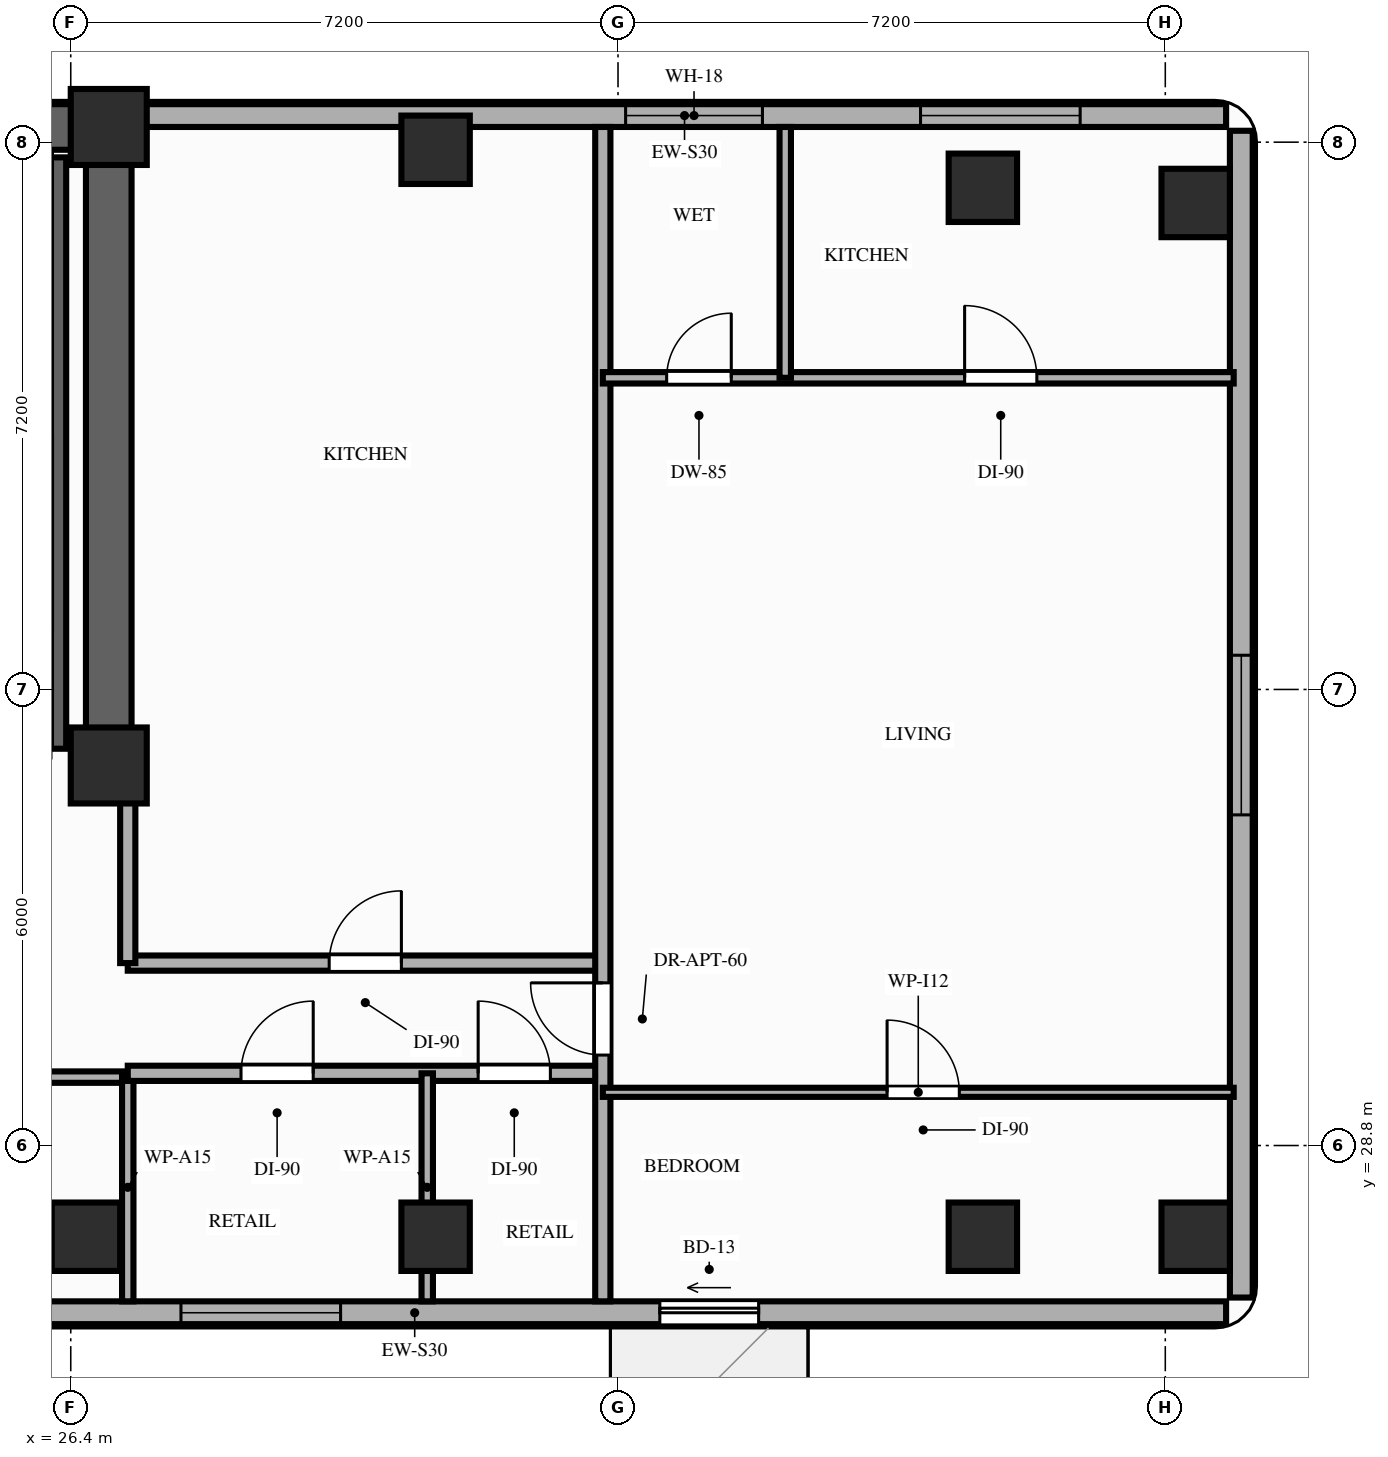
"""IFC4 building model, lengths in metres.
Left out: names, types, materials, properties, quantities, classifications, styles, units other than length and angle.
Written with IfcOpenShell. Run it as: python <this file> out.ifc"""

import sys

from ifc_helpers import new_model, si_unit, direction, frame, frame_2d, origin, origin_2d, place, context, subcontext, project, spatial, rectangle, extrude, element, fill, save


model = new_model("IFC4")
c1 = context("Model", 3, precision=1e-05, world=origin(), true_north=direction((0.0, 1.0)))
c2 = subcontext(c1, "Body", "Model", "MODEL_VIEW")
j1 = project(units=[si_unit("LENGTHUNIT", "METRE"), si_unit("PLANEANGLEUNIT", "RADIAN")], contexts=[c1])
p1 = place(None, origin())
s1 = spatial("IfcSite", under=j1, at=p1, CompositionType="ELEMENT")
p2 = place(p1, origin())
s2 = spatial("IfcBuilding", under=s1, at=p2, CompositionType="ELEMENT")
p3 = place(p2, frame((0.0, 0.0, 176.0)))
s3 = spatial("IfcBuildingStorey", under=s2, at=p3, CompositionType="ELEMENT", Elevation=176.0)
for number, where, z_axis, x_axis in (
    (1, (26.9, 33.8, 0.0), (0.0, 0.0, 1.0), (1.0, 0.0, 0.0)),
    (2, (26.9, 42.2, 0.0), (0.0, 0.0, 1.0), (1.0, 0.0, 0.0)),
):
    element("IfcColumn", number, at=place(p3, frame(where, z_axis=z_axis, x_axis=x_axis)), inside=s3, PredefinedType="COLUMN", context=c2, shape_type="SweptSolid", body=[
        extrude(rectangle(XDim=1.0, YDim=1.0, at=origin_2d()), origin(), (0.0, 0.0, 1.0), 3.2),
    ])
for number, where, z_axis, x_axis in (
    (3, (26.6, 27.6, 0.0), (0.0, 0.0, 1.0), (1.0, 0.0, 0.0)),
    (4, (31.2, 27.6, 0.0), (0.0, 0.0, 1.0), (1.0, 0.0, 0.0)),
    (5, (31.2, 41.9, 0.0), (0.0, 0.0, 1.0), (1.0, 0.0, 0.0)),
    (6, (38.4, 27.6, 0.0), (0.0, 0.0, 1.0), (1.0, 0.0, 0.0)),
    (7, (38.4, 41.4, 0.0), (0.0, 0.0, 1.0), (1.0, 0.0, 0.0)),
    (8, (41.2, 27.6, 0.0), (0.0, 0.0, 1.0), (1.0, 0.0, 0.0)),
    (9, (41.2, 41.2, 0.0), (0.0, 0.0, 1.0), (1.0, 0.0, 0.0)),
):
    element("IfcColumn", number, at=place(p3, frame(where, z_axis=z_axis, x_axis=x_axis)), inside=s3, PredefinedType="COLUMN", context=c2, shape_type="SweptSolid", body=[
        extrude(rectangle(XDim=0.9, YDim=0.9, at=origin_2d()), origin(), (0.0, 0.0, 1.0), 3.2),
    ])
p4 = place(p3, frame((41.6, 42.35, 0.0), z_axis=(0.0, 0.0, 1.0), x_axis=(-1.0, 0.0, 0.0)))
e10 = element("IfcWall", 10, at=p4, inside=s3, PredefinedType="STANDARD", context=c2, shape_type="SweptSolid", body=[
    extrude(rectangle(XDim=14.25, YDim=0.3, at=frame_2d((7.125, 0.0))), origin(), (0.0, 0.0, 1.0), 2.46),
])
p5 = place(p4, frame((6.1, 0.0, 0.85)))
e11 = element("IfcOpeningElement", 11, at=p5, cuts=e10, PredefinedType="OPENING", context=c2, shape_type="SweptSolid", body=[
    extrude(rectangle(XDim=1.8, YDim=1.36, at=frame_2d((0.9, 0.68))), frame((0.0, 0.16, 0.0), z_axis=(0.0, -1.0, 0.0), x_axis=(1.0, 0.0, 0.0)), (0.0, 0.0, 1.0), 0.32),
])
p6 = place(p4, frame((1.92, 0.0, 0.85)))
e12 = element("IfcOpeningElement", 12, at=p6, cuts=e10, PredefinedType="OPENING", context=c2, shape_type="SweptSolid", body=[
    extrude(rectangle(XDim=2.1, YDim=1.36, at=frame_2d((1.05, 0.68))), frame((0.0, 0.16, 0.0), z_axis=(0.0, -1.0, 0.0), x_axis=(1.0, 0.0, 0.0)), (0.0, 0.0, 1.0), 0.32),
])
p7 = place(p3, frame((20.25, 26.6, 0.0), z_axis=(0.0, 0.0, 1.0), x_axis=(1.0, 0.0, 0.0)))
e13 = element("IfcWall", 13, at=p7, inside=s3, PredefinedType="STANDARD", context=c2, shape_type="SweptSolid", body=[
    extrude(rectangle(XDim=21.35, YDim=0.3, at=frame_2d((10.675, 0.0))), origin(), (0.0, 0.0, 1.0), 2.71),
])
p8 = place(p7, frame((13.9, 0.0, 0.0)))
e14 = element("IfcOpeningElement", 14, at=p8, cuts=e13, PredefinedType="OPENING", context=c2, shape_type="SweptSolid", body=[
    extrude(rectangle(XDim=1.3, YDim=2.08, at=frame_2d((0.65, 1.04))), frame((0.0, 0.16, 0.0), z_axis=(0.0, -1.0, 0.0), x_axis=(1.0, 0.0, 0.0)), (0.0, 0.0, 1.0), 0.32),
])
p9 = place(p7, frame((2.1, 0.0, 0.85)))
e15 = element("IfcOpeningElement", 15, at=p9, cuts=e13, PredefinedType="OPENING", context=c2, shape_type="SweptSolid", body=[
    extrude(rectangle(XDim=2.1, YDim=1.61, at=frame_2d((1.05, 0.805))), frame((0.0, 0.16, 0.0), z_axis=(0.0, -1.0, 0.0), x_axis=(1.0, 0.0, 0.0)), (0.0, 0.0, 1.0), 0.32),
])
p10 = place(p7, frame((7.6, 0.0, 0.85)))
e16 = element("IfcOpeningElement", 16, at=p10, cuts=e13, PredefinedType="OPENING", context=c2, shape_type="SweptSolid", body=[
    extrude(rectangle(XDim=2.1, YDim=1.61, at=frame_2d((1.05, 0.805))), frame((0.0, 0.16, 0.0), z_axis=(0.0, -1.0, 0.0), x_axis=(1.0, 0.0, 0.0)), (0.0, 0.0, 1.0), 0.32),
])
p11 = place(p3, frame((41.8, 26.8, 0.0), z_axis=(0.0, 0.0, 1.0), x_axis=(0.0, 1.0, 0.0)))
e17 = element("IfcWall", 17, at=p11, inside=s3, PredefinedType="STANDARD", context=c2, shape_type="SweptSolid", body=[
    extrude(rectangle(XDim=15.35, YDim=0.3, at=frame_2d((7.675, 0.0))), origin(), (0.0, 0.0, 1.0), 3.02),
])
p12 = place(p11, frame((6.35, 0.0, 0.85)))
e18 = element("IfcOpeningElement", 18, at=p12, cuts=e17, PredefinedType="OPENING", context=c2, shape_type="SweptSolid", body=[
    extrude(rectangle(XDim=2.1, YDim=1.8, at=frame_2d((1.05, 0.9))), frame((0.0, 0.16, 0.0), z_axis=(0.0, -1.0, 0.0), x_axis=(1.0, 0.0, 0.0)), (0.0, 0.0, 1.0), 0.32),
])
p13 = place(p3, frame((6.45, 42.2, 0.0), z_axis=(0.0, 0.0, 1.0), x_axis=(1.0, 0.0, 0.0)))
e19 = element("IfcWall", 19, at=p13, inside=s3, PredefinedType="SHEAR", context=c2, shape_type="SweptSolid", body=[
    extrude(rectangle(XDim=20.45, YDim=0.6, at=frame_2d((10.225, 0.0))), origin(), (0.0, 0.0, 1.0), 3.02),
])
p14 = place(p3, frame((26.9, 33.8, 0.0), z_axis=(0.0, 0.0, 1.0), x_axis=(0.0, 1.0, 0.0)))
e20 = element("IfcWall", 20, at=p14, inside=s3, PredefinedType="SHEAR", context=c2, shape_type="SweptSolid", body=[
    extrude(rectangle(XDim=7.95, YDim=0.6, at=frame_2d((3.975, 0.0))), origin(), (0.0, 0.0, 1.0), 3.02),
])
p15 = place(p3, frame((26.24, 34.02, 0.0), z_axis=(0.0, 0.0, 1.0), x_axis=(0.0, 1.0, 0.0)))
e21 = element("IfcWall", 21, at=p15, inside=s3, PredefinedType="SHEAR", context=c2, shape_type="SweptSolid", body=[
    extrude(rectangle(XDim=7.78, YDim=0.2, at=frame_2d((3.89, 0.0))), origin(), (0.0, 0.0, 1.0), 3.02),
])
p16 = place(p3, frame((20.45, 29.7, 0.0), z_axis=(0.0, 0.0, 1.0), x_axis=(1.0, 0.0, 0.0)))
e22 = element("IfcWall", 22, at=p16, inside=s3, PredefinedType="PARTITIONING", context=c2, shape_type="SweptSolid", body=[
    extrude(rectangle(XDim=6.7, YDim=0.15, at=frame_2d((3.35, 0.0))), origin(), (0.0, 0.0, 1.0), 3.02),
])
p17 = place(p16, frame((2.8, 0.0, 0.0)))
e23 = element("IfcOpeningElement", 23, at=p17, cuts=e22, PredefinedType="OPENING", context=c2, shape_type="SweptSolid", body=[
    extrude(rectangle(XDim=0.95, YDim=2.15, at=frame_2d((0.475, 1.075))), frame((0.0, 0.085, 0.0), z_axis=(0.0, -1.0, 0.0), x_axis=(1.0, 0.0, 0.0)), (0.0, 0.0, 1.0), 0.17),
])
p18 = place(p3, frame((27.15, 26.75, 0.0), z_axis=(0.0, 0.0, 1.0), x_axis=(0.0, 1.0, 0.0)))
e24 = element("IfcWall", 24, at=p18, inside=s3, PredefinedType="PARTITIONING", context=c2, shape_type="SweptSolid", body=[
    extrude(rectangle(XDim=3.0, YDim=0.15, at=frame_2d((1.5, 0.0))), origin(), (0.0, 0.0, 1.0), 2.46),
])
p19 = place(p3, frame((27.15, 29.75, 0.0), z_axis=(0.0, 0.0, 1.0), x_axis=(1.0, 0.0, 0.0)))
e25 = element("IfcWall", 25, at=p19, inside=s3, PredefinedType="PARTITIONING", context=c2, shape_type="SweptSolid", body=[
    extrude(rectangle(XDim=6.25, YDim=0.2, at=frame_2d((3.125, 0.0))), origin(), (0.0, 0.0, 1.0), 2.46),
])
p20 = place(p19, frame((1.49, 0.0, 0.0)))
e26 = element("IfcOpeningElement", 26, at=p20, cuts=e25, PredefinedType="OPENING", context=c2, shape_type="SweptSolid", body=[
    extrude(rectangle(XDim=0.95, YDim=2.15, at=frame_2d((0.475, 1.075))), frame((0.0, 0.11, 0.0), z_axis=(0.0, -1.0, 0.0), x_axis=(1.0, 0.0, 0.0)), (0.0, 0.0, 1.0), 0.22),
])
p21 = place(p19, frame((4.61, 0.0, 0.0)))
e27 = element("IfcOpeningElement", 27, at=p21, cuts=e25, PredefinedType="OPENING", context=c2, shape_type="SweptSolid", body=[
    extrude(rectangle(XDim=0.95, YDim=2.15, at=frame_2d((0.475, 1.075))), frame((0.0, 0.11, 0.0), z_axis=(0.0, -1.0, 0.0), x_axis=(1.0, 0.0, 0.0)), (0.0, 0.0, 1.0), 0.22),
])
p22 = place(p3, frame((27.15, 31.2, 0.0), z_axis=(0.0, 0.0, 1.0), x_axis=(1.0, 0.0, 0.0)))
e28 = element("IfcWall", 28, at=p22, inside=s3, PredefinedType="PARTITIONING", context=c2, shape_type="SweptSolid", body=[
    extrude(rectangle(XDim=6.25, YDim=0.2, at=frame_2d((3.125, 0.0))), origin(), (0.0, 0.0, 1.0), 2.46),
])
p23 = place(p22, frame((2.65, 0.0, 0.0)))
e29 = element("IfcOpeningElement", 29, at=p23, cuts=e28, PredefinedType="OPENING", context=c2, shape_type="SweptSolid", body=[
    extrude(rectangle(XDim=0.95, YDim=2.15, at=frame_2d((0.475, 1.075))), frame((0.0, 0.11, 0.0), z_axis=(0.0, -1.0, 0.0), x_axis=(1.0, 0.0, 0.0)), (0.0, 0.0, 1.0), 0.22),
])
p24 = place(p3, frame((27.15, 31.2, 0.0), z_axis=(0.0, 0.0, 1.0), x_axis=(0.0, 1.0, 0.0)))
e30 = element("IfcWall", 30, at=p24, inside=s3, PredefinedType="PARTITIONING", context=c2, shape_type="SweptSolid", body=[
    extrude(rectangle(XDim=2.48, YDim=0.2, at=frame_2d((1.24, 0.0))), origin(), (0.0, 0.0, 1.0), 2.46),
])
p25 = place(p3, frame((33.4, 26.75, 0.0), z_axis=(0.0, 0.0, 1.0), x_axis=(0.0, 1.0, 0.0)))
e31 = element("IfcWall", 31, at=p25, inside=s3, PredefinedType="PARTITIONING", context=c2, shape_type="SweptSolid", body=[
    extrude(rectangle(XDim=15.45, YDim=0.2, at=frame_2d((7.725, 0.0))), origin(), (0.0, 0.0, 1.0), 2.46),
])
p26 = place(p25, frame((3.24, 0.0, 0.0)))
e32 = element("IfcOpeningElement", 32, at=p26, cuts=e31, PredefinedType="OPENING", context=c2, shape_type="SweptSolid", body=[
    extrude(rectangle(XDim=0.95, YDim=2.15, at=frame_2d((0.475, 1.075))), frame((0.0, 0.11, 0.0), z_axis=(0.0, -1.0, 0.0), x_axis=(1.0, 0.0, 0.0)), (0.0, 0.0, 1.0), 0.22),
])
p27 = place(p3, frame((33.4, 29.5, 0.0), z_axis=(0.0, 0.0, 1.0), x_axis=(1.0, 0.0, 0.0)))
e33 = element("IfcWall", 33, at=p27, inside=s3, PredefinedType="PARTITIONING", context=c2, shape_type="SweptSolid", body=[
    extrude(rectangle(XDim=8.3, YDim=0.12, at=frame_2d((4.15, 0.0))), origin(), (0.0, 0.0, 1.0), 2.46),
])
p28 = place(p27, frame((3.74, 0.0, 0.0)))
e34 = element("IfcOpeningElement", 34, at=p28, cuts=e33, PredefinedType="OPENING", context=c2, shape_type="SweptSolid", body=[
    extrude(rectangle(XDim=0.95, YDim=2.15, at=frame_2d((0.475, 1.075))), frame((0.0, 0.07, 0.0), z_axis=(0.0, -1.0, 0.0), x_axis=(1.0, 0.0, 0.0)), (0.0, 0.0, 1.0), 0.14),
])
p29 = place(p3, frame((33.4, 38.9, 0.0), z_axis=(0.0, 0.0, 1.0), x_axis=(1.0, 0.0, 0.0)))
e35 = element("IfcWall", 35, at=p29, inside=s3, PredefinedType="PARTITIONING", context=c2, shape_type="SweptSolid", body=[
    extrude(rectangle(XDim=8.3, YDim=0.15, at=frame_2d((4.15, 0.0))), origin(), (0.0, 0.0, 1.0), 2.46),
])
p30 = place(p29, frame((0.84, 0.0, 0.0)))
e36 = element("IfcOpeningElement", 36, at=p30, cuts=e35, PredefinedType="OPENING", context=c2, shape_type="SweptSolid", body=[
    extrude(rectangle(XDim=0.85, YDim=2.1, at=frame_2d((0.425, 1.05))), frame((0.0, 0.085, 0.0), z_axis=(0.0, -1.0, 0.0), x_axis=(1.0, 0.0, 0.0)), (0.0, 0.0, 1.0), 0.17),
])
p31 = place(p29, frame((4.76, 0.0, 0.0)))
e37 = element("IfcOpeningElement", 37, at=p31, cuts=e35, PredefinedType="OPENING", context=c2, shape_type="SweptSolid", body=[
    extrude(rectangle(XDim=0.95, YDim=2.15, at=frame_2d((0.475, 1.075))), frame((0.0, 0.085, 0.0), z_axis=(0.0, -1.0, 0.0), x_axis=(1.0, 0.0, 0.0)), (0.0, 0.0, 1.0), 0.17),
])
p32 = place(p3, frame((35.8, 38.9, 0.0), z_axis=(0.0, 0.0, 1.0), x_axis=(0.0, 1.0, 0.0)))
e38 = element("IfcWall", 38, at=p32, inside=s3, PredefinedType="PARTITIONING", context=c2, shape_type="SweptSolid", body=[
    extrude(rectangle(XDim=3.3, YDim=0.15, at=frame_2d((1.65, 0.0))), origin(), (0.0, 0.0, 1.0), 2.46),
])
p33 = place(p3, frame((31.09, 26.75, 0.0), z_axis=(0.0, 0.0, 1.0), x_axis=(0.0, 1.0, 0.0)))
e39 = element("IfcWall", 39, at=p33, inside=s3, PredefinedType="PARTITIONING", context=c2, shape_type="SweptSolid", body=[
    extrude(rectangle(XDim=3.0, YDim=0.15, at=frame_2d((1.5, 0.0))), origin(), (0.0, 0.0, 1.0), 2.46),
])
p34 = place(p8, origin())
e40 = element("IfcDoor", 40, at=p34, inside=s3, OperationType="SLIDING_TO_LEFT", PredefinedType="DOOR", context=c2, shape_type="SweptSolid", body=[
    extrude(rectangle(XDim=1.3, YDim=2.08, at=frame_2d((0.65, 1.04))), frame((0.0, 0.025, 0.0), z_axis=(0.0, -1.0, 0.0), x_axis=(1.0, 0.0, 0.0)), (0.0, 0.0, 1.0), 0.05),
])
fill(e14, e40)
p35 = place(p12, origin())
e41 = element("IfcWindow", 41, at=p35, inside=s3, PartitioningType="SINGLE_PANEL", PredefinedType="WINDOW", context=c2, shape_type="SweptSolid", body=[
    extrude(rectangle(XDim=2.1, YDim=1.8, at=frame_2d((1.05, 0.9))), frame((0.0, 0.03, 0.0), z_axis=(0.0, -1.0, 0.0), x_axis=(1.0, 0.0, 0.0)), (0.0, 0.0, 1.0), 0.06),
])
fill(e18, e41)
p36 = place(p5, origin())
e42 = element("IfcWindow", 42, at=p36, inside=s3, PartitioningType="SINGLE_PANEL", PredefinedType="WINDOW", context=c2, shape_type="SweptSolid", body=[
    extrude(rectangle(XDim=1.8, YDim=1.36, at=frame_2d((0.9, 0.68))), frame((0.0, 0.03, 0.0), z_axis=(0.0, -1.0, 0.0), x_axis=(1.0, 0.0, 0.0)), (0.0, 0.0, 1.0), 0.06),
])
fill(e11, e42)
p37 = place(p6, origin())
e43 = element("IfcWindow", 43, at=p37, inside=s3, PartitioningType="SINGLE_PANEL", PredefinedType="WINDOW", context=c2, shape_type="SweptSolid", body=[
    extrude(rectangle(XDim=2.1, YDim=1.36, at=frame_2d((1.05, 0.68))), frame((0.0, 0.03, 0.0), z_axis=(0.0, -1.0, 0.0), x_axis=(1.0, 0.0, 0.0)), (0.0, 0.0, 1.0), 0.06),
])
fill(e12, e43)
p38 = place(p10, origin())
e44 = element("IfcWindow", 44, at=p38, inside=s3, PartitioningType="SINGLE_PANEL", PredefinedType="WINDOW", context=c2, shape_type="SweptSolid", body=[
    extrude(rectangle(XDim=2.1, YDim=1.61, at=frame_2d((1.05, 0.805))), frame((0.0, 0.03, 0.0), z_axis=(0.0, -1.0, 0.0), x_axis=(1.0, 0.0, 0.0)), (0.0, 0.0, 1.0), 0.06),
])
fill(e16, e44)
p39 = place(p26, origin())
e45 = element("IfcDoor", 45, at=p39, inside=s3, OperationType="SINGLE_SWING_RIGHT", PredefinedType="DOOR", context=c2, shape_type="SweptSolid", body=[
    extrude(rectangle(XDim=0.95, YDim=2.15, at=frame_2d((0.475, 1.075))), frame((0.0, 0.025, 0.0), z_axis=(0.0, -1.0, 0.0), x_axis=(1.0, 0.0, 0.0)), (0.0, 0.0, 1.0), 0.05),
])
fill(e32, e45)
p40 = place(p28, origin())
e46 = element("IfcDoor", 46, at=p40, inside=s3, OperationType="SINGLE_SWING_LEFT", PredefinedType="DOOR", context=c2, shape_type="SweptSolid", body=[
    extrude(rectangle(XDim=0.95, YDim=2.15, at=frame_2d((0.475, 1.075))), frame((0.0, 0.025, 0.0), z_axis=(0.0, -1.0, 0.0), x_axis=(1.0, 0.0, 0.0)), (0.0, 0.0, 1.0), 0.05),
])
fill(e34, e46)
p41 = place(p30, origin())
e47 = element("IfcDoor", 47, at=p41, inside=s3, OperationType="SINGLE_SWING_RIGHT", PredefinedType="DOOR", context=c2, shape_type="SweptSolid", body=[
    extrude(rectangle(XDim=0.85, YDim=2.1, at=frame_2d((0.425, 1.05))), frame((0.0, 0.025, 0.0), z_axis=(0.0, -1.0, 0.0), x_axis=(1.0, 0.0, 0.0)), (0.0, 0.0, 1.0), 0.05),
])
fill(e36, e47)
p42 = place(p31, origin())
e48 = element("IfcDoor", 48, at=p42, inside=s3, OperationType="SINGLE_SWING_LEFT", PredefinedType="DOOR", context=c2, shape_type="SweptSolid", body=[
    extrude(rectangle(XDim=0.95, YDim=2.15, at=frame_2d((0.475, 1.075))), frame((0.0, 0.025, 0.0), z_axis=(0.0, -1.0, 0.0), x_axis=(1.0, 0.0, 0.0)), (0.0, 0.0, 1.0), 0.05),
])
fill(e37, e48)
p43 = place(p20, origin())
e49 = element("IfcDoor", 49, at=p43, inside=s3, OperationType="SINGLE_SWING_RIGHT", PredefinedType="DOOR", context=c2, shape_type="SweptSolid", body=[
    extrude(rectangle(XDim=0.95, YDim=2.15, at=frame_2d((0.475, 1.075))), frame((0.0, 0.025, 0.0), z_axis=(0.0, -1.0, 0.0), x_axis=(1.0, 0.0, 0.0)), (0.0, 0.0, 1.0), 0.05),
])
fill(e26, e49)
p44 = place(p21, origin())
e50 = element("IfcDoor", 50, at=p44, inside=s3, OperationType="SINGLE_SWING_LEFT", PredefinedType="DOOR", context=c2, shape_type="SweptSolid", body=[
    extrude(rectangle(XDim=0.95, YDim=2.15, at=frame_2d((0.475, 1.075))), frame((0.0, 0.025, 0.0), z_axis=(0.0, -1.0, 0.0), x_axis=(1.0, 0.0, 0.0)), (0.0, 0.0, 1.0), 0.05),
])
fill(e27, e50)
p45 = place(p23, origin())
e51 = element("IfcDoor", 51, at=p45, inside=s3, OperationType="SINGLE_SWING_RIGHT", PredefinedType="DOOR", context=c2, shape_type="SweptSolid", body=[
    extrude(rectangle(XDim=0.95, YDim=2.15, at=frame_2d((0.475, 1.075))), frame((0.0, 0.025, 0.0), z_axis=(0.0, -1.0, 0.0), x_axis=(1.0, 0.0, 0.0)), (0.0, 0.0, 1.0), 0.05),
])
fill(e29, e51)
save(model, sys.argv[1])
